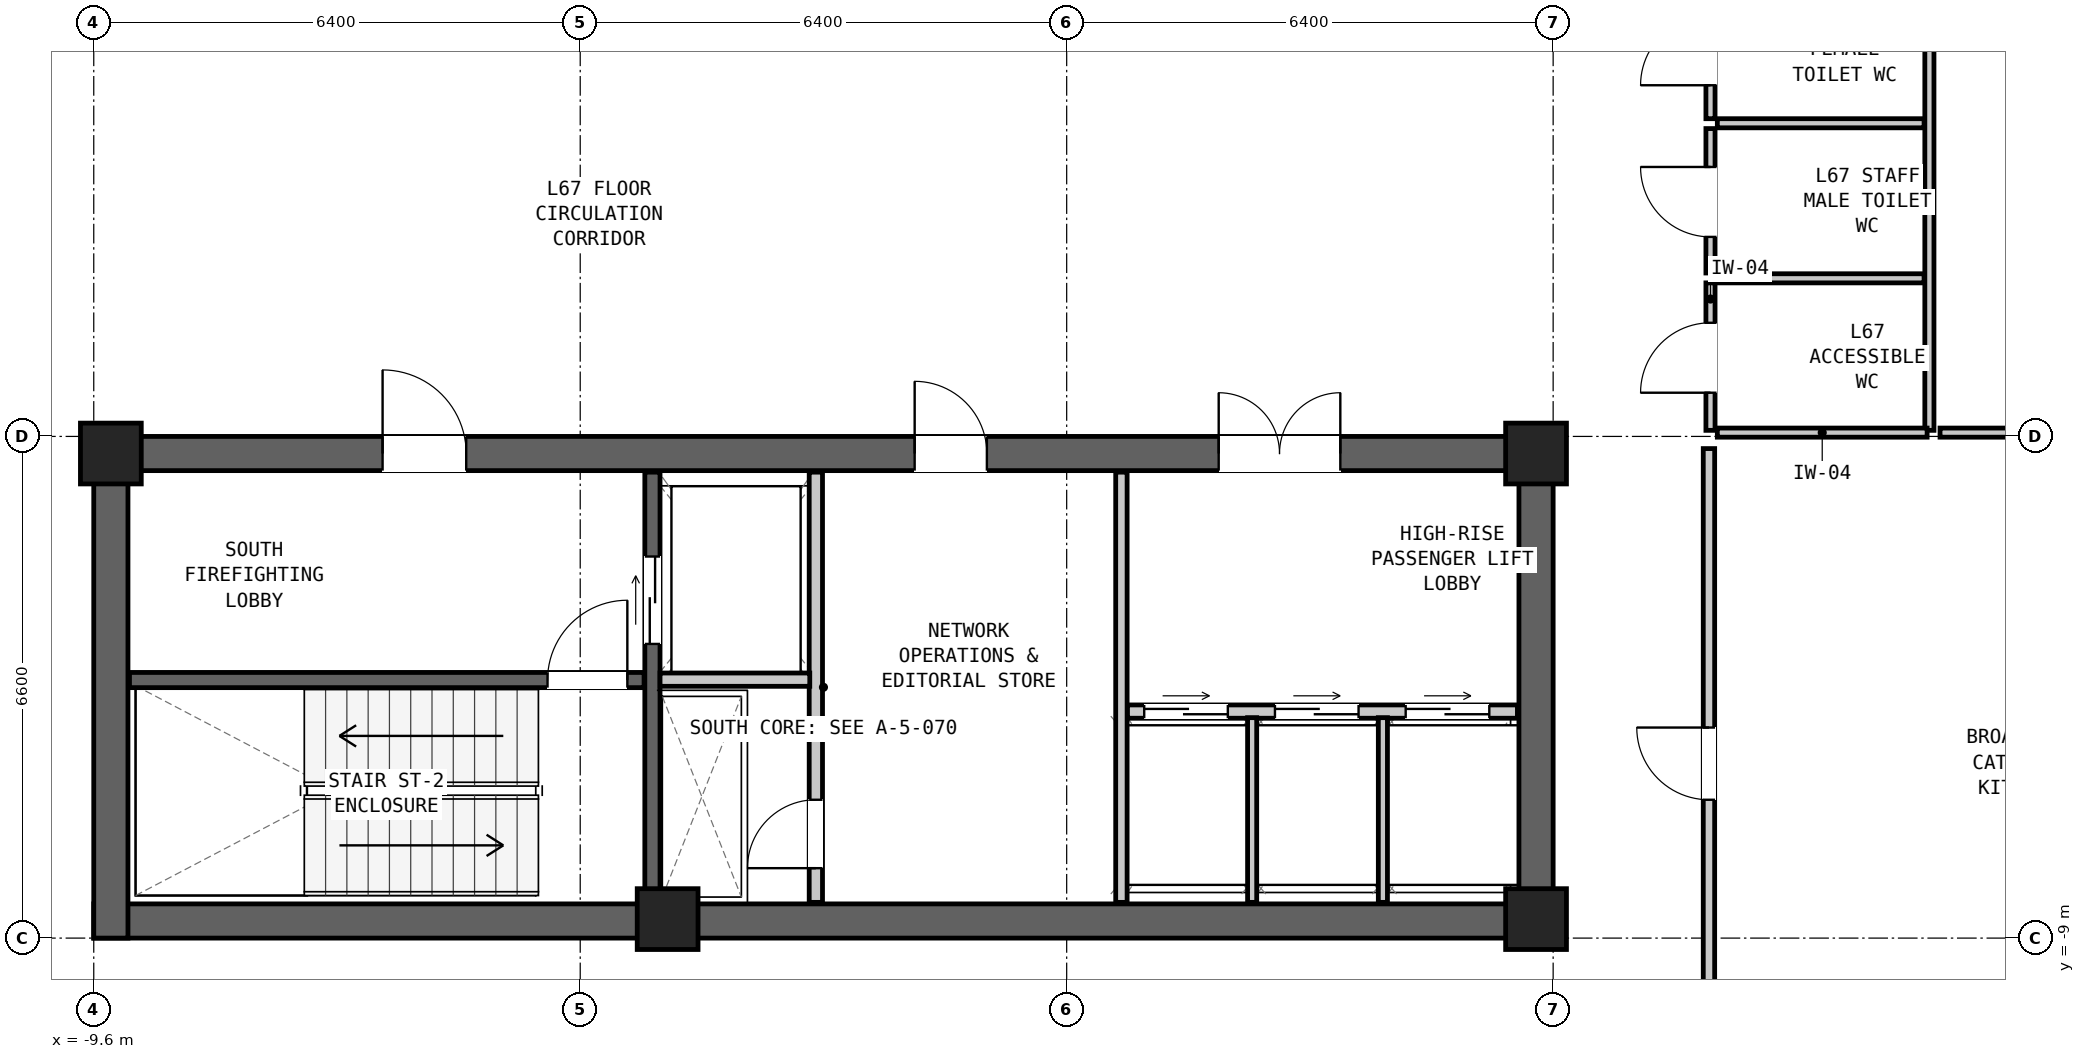
"""IFC4 building model, lengths in metres.
Left out: names, types, materials, properties, quantities, classifications, styles, units other than length and angle.
Written with IfcOpenShell. Run it as: python <this file> out.ifc"""

import sys

from ifc_helpers import new_model, si_unit, direction, frame, frame_2d, origin, origin_2d, place, context, subcontext, project, spatial, rectangle, extrude, element, fill, save


model = new_model("IFC4")
c1 = context("Model", 3, precision=1e-05, world=origin(), true_north=direction((0.0, 1.0)))
c2 = subcontext(c1, "Body", "Model", "MODEL_VIEW")
j1 = project(units=[si_unit("LENGTHUNIT", "METRE"), si_unit("PLANEANGLEUNIT", "RADIAN")], contexts=[c1])
p1 = place(None, origin())
s1 = spatial("IfcSite", under=j1, at=p1, CompositionType="ELEMENT")
p2 = place(p1, origin())
s2 = spatial("IfcBuilding", under=s1, at=p2, CompositionType="ELEMENT")
p3 = place(p2, frame((0.0, 0.0, 226.95)))
s3 = spatial("IfcBuildingStorey", under=s2, at=p3, CompositionType="ELEMENT", Elevation=226.95)
p4 = place(p3, frame((-9.6, -8.775, 0.0), z_axis=(0.0, 0.0, 1.0), x_axis=(1.0, 0.0, 0.0)))
e1 = element("IfcWall", 1, at=p4, inside=s3, PredefinedType="SHEAR", context=c2, shape_type="SweptSolid", body=[
    extrude(rectangle(XDim=19.2, YDim=0.45, at=frame_2d((9.6, 0.0))), origin(), (0.0, 0.0, 1.0), 4.35),
])
p5 = place(p3, frame((-9.6, -2.625, 0.0), z_axis=(0.0, 0.0, 1.0), x_axis=(1.0, 0.0, 0.0)))
e2 = element("IfcWall", 2, at=p5, inside=s3, PredefinedType="SHEAR", context=c2, shape_type="SweptSolid", body=[
    extrude(rectangle(XDim=19.2, YDim=0.45, at=frame_2d((9.6, 0.0))), origin(), (0.0, 0.0, 1.0), 4.35),
])
p6 = place(p5, frame((3.8, 0.0, 0.0)))
e3 = element("IfcOpeningElement", 3, at=p6, cuts=e2, PredefinedType="OPENING", context=c2, shape_type="SweptSolid", body=[
    extrude(rectangle(XDim=1.1, YDim=2.08, at=frame_2d((0.55, 1.04))), frame((0.0, 0.237, 0.0), z_axis=(0.0, -1.0, 0.0), x_axis=(1.0, 0.0, 0.0)), (0.0, 0.0, 1.0), 0.474),
])
p7 = place(p5, frame((10.8, 0.0, 0.0)))
e4 = element("IfcOpeningElement", 4, at=p7, cuts=e2, PredefinedType="OPENING", context=c2, shape_type="SweptSolid", body=[
    extrude(rectangle(XDim=0.95, YDim=2.1, at=frame_2d((0.475, 1.05))), frame((0.0, 0.237, 0.0), z_axis=(0.0, -1.0, 0.0), x_axis=(1.0, 0.0, 0.0)), (0.0, 0.0, 1.0), 0.474),
])
p8 = place(p5, frame((14.8, 0.0, 0.0)))
e5 = element("IfcOpeningElement", 5, at=p8, cuts=e2, PredefinedType="OPENING", context=c2, shape_type="SweptSolid", body=[
    extrude(rectangle(XDim=1.6, YDim=2.12, at=frame_2d((0.8, 1.06))), frame((0.0, 0.237, 0.0), z_axis=(0.0, -1.0, 0.0), x_axis=(1.0, 0.0, 0.0)), (0.0, 0.0, 1.0), 0.474),
])
for number, where, z_axis, x_axis in (
    (6, (-9.375, -9.0, 0.0), (0.0, 0.0, 1.0), (0.0, 1.0, 0.0)),
    (7, (9.375, -9.0, 0.0), (0.0, 0.0, 1.0), (0.0, 1.0, 0.0)),
):
    element("IfcWall", number, at=place(p3, frame(where, z_axis=z_axis, x_axis=x_axis)), inside=s3, PredefinedType="SHEAR", context=c2, shape_type="SweptSolid", body=[
        extrude(rectangle(XDim=6.6, YDim=0.45, at=frame_2d((3.3, 0.0))), origin(), (0.0, 0.0, 1.0), 4.35),
    ])
for number, where, z_axis, x_axis in (
    (8, (-9.375, -2.625, 0.0), (0.0, 0.0, 1.0), (1.0, 0.0, 0.0)),
    (9, (9.375, -2.625, 0.0), (0.0, 0.0, 1.0), (1.0, 0.0, 0.0)),
    (10, (-2.05, -8.75, 0.0), (0.0, 0.0, 1.0), (1.0, 0.0, 0.0)),
    (11, (9.375, -8.75, 0.0), (0.0, 0.0, 1.0), (1.0, 0.0, 0.0)),
):
    element("IfcColumn", number, at=place(p3, frame(where, z_axis=z_axis, x_axis=x_axis)), inside=s3, PredefinedType="COLUMN", context=c2, shape_type="SweptSolid", body=[
        extrude(rectangle(XDim=0.8, YDim=0.8, at=origin_2d()), origin(), (0.0, 0.0, 1.0), 4.35),
    ])
p9 = place(p3, frame((-9.13, -5.605, 0.0), z_axis=(0.0, 0.0, 1.0), x_axis=(1.0, 0.0, 0.0)))
e12 = element("IfcWall", 12, at=p9, inside=s3, PredefinedType="SHEAR", context=c2, shape_type="SweptSolid", body=[
    extrude(rectangle(XDim=6.77, YDim=0.2, at=frame_2d((3.385, 0.0))), origin(), (0.0, 0.0, 1.0), 4.07),
])
p10 = place(p9, frame((5.5, 0.0, 0.0)))
e13 = element("IfcOpeningElement", 13, at=p10, cuts=e12, PredefinedType="OPENING", context=c2, shape_type="SweptSolid", body=[
    extrude(rectangle(XDim=1.05, YDim=2.08, at=frame_2d((0.525, 1.04))), frame((0.0, 0.112, 0.0), z_axis=(0.0, -1.0, 0.0), x_axis=(1.0, 0.0, 0.0)), (0.0, 0.0, 1.0), 0.224),
])
p11 = place(p3, frame((-2.25, -8.53, 0.0), z_axis=(0.0, 0.0, 1.0), x_axis=(0.0, 1.0, 0.0)))
e14 = element("IfcWall", 14, at=p11, inside=s3, PredefinedType="SHEAR", context=c2, shape_type="SweptSolid", body=[
    extrude(rectangle(XDim=5.66, YDim=0.2, at=frame_2d((2.83, 0.0))), origin(), (0.0, 0.0, 1.0), 4.07),
])
p12 = place(p11, frame((3.4, 0.0, 0.0)))
e15 = element("IfcOpeningElement", 15, at=p12, cuts=e14, PredefinedType="OPENING", context=c2, shape_type="SweptSolid", body=[
    extrude(rectangle(XDim=1.15, YDim=2.08, at=frame_2d((0.575, 1.04))), frame((0.0, 0.112, 0.0), z_axis=(0.0, -1.0, 0.0), x_axis=(1.0, 0.0, 0.0)), (0.0, 0.0, 1.0), 0.224),
])
p13 = place(p3, frame((-0.1, -8.53, 0.0), z_axis=(0.0, 0.0, 1.0), x_axis=(0.0, 1.0, 0.0)))
e16 = element("IfcWall", 16, at=p13, inside=s3, PredefinedType="PARTITIONING", context=c2, shape_type="SweptSolid", body=[
    extrude(rectangle(XDim=5.66, YDim=0.175, at=frame_2d((2.83, 0.0))), origin(), (0.0, 0.0, 1.0), 4.07),
])
p14 = place(p13, frame((0.45, 0.0, 0.0)))
e17 = element("IfcOpeningElement", 17, at=p14, cuts=e16, PredefinedType="OPENING", context=c2, shape_type="SweptSolid", body=[
    extrude(rectangle(XDim=0.9, YDim=2.05, at=frame_2d((0.45, 1.025))), frame((0.0, 0.1, 0.0), z_axis=(0.0, -1.0, 0.0), x_axis=(1.0, 0.0, 0.0)), (0.0, 0.0, 1.0), 0.199),
])
p15 = place(p3, frame((-2.15, -5.6, 0.0), z_axis=(0.0, 0.0, 1.0), x_axis=(1.0, 0.0, 0.0)))
e18 = element("IfcWall", 18, at=p15, inside=s3, PredefinedType="PARTITIONING", context=c2, shape_type="SweptSolid", body=[
    extrude(rectangle(XDim=1.97, YDim=0.175, at=frame_2d((0.985, 0.0))), origin(), (0.0, 0.0, 1.0), 4.07),
])
p16 = place(p3, frame((3.92, -8.53, 0.0), z_axis=(0.0, 0.0, 1.0), x_axis=(0.0, 1.0, 0.0)))
e19 = element("IfcWall", 19, at=p16, inside=s3, PredefinedType="PARTITIONING", context=c2, shape_type="SweptSolid", body=[
    extrude(rectangle(XDim=5.66, YDim=0.15, at=frame_2d((2.83, 0.0))), origin(), (0.0, 0.0, 1.0), 4.07),
])
p17 = place(p3, frame((4.0, -6.02, 0.0), z_axis=(0.0, 0.0, 1.0), x_axis=(1.0, 0.0, 0.0)))
e20 = element("IfcWall", 20, at=p17, inside=s3, PredefinedType="PARTITIONING", context=c2, shape_type="SweptSolid", body=[
    extrude(rectangle(XDim=5.13, YDim=0.175, at=frame_2d((2.565, 0.0))), origin(), (0.0, 0.0, 1.0), 4.07),
])
p18 = place(p17, frame((0.22, 0.0, 0.0)))
e21 = element("IfcOpeningElement", 21, at=p18, cuts=e20, PredefinedType="OPENING", context=c2, shape_type="SweptSolid", body=[
    extrude(rectangle(XDim=1.1, YDim=2.06, at=frame_2d((0.55, 1.03))), frame((0.0, 0.1, 0.0), z_axis=(0.0, -1.0, 0.0), x_axis=(1.0, 0.0, 0.0)), (0.0, 0.0, 1.0), 0.199),
])
p19 = place(p17, frame((1.94, 0.0, 0.0)))
e22 = element("IfcOpeningElement", 22, at=p19, cuts=e20, PredefinedType="OPENING", context=c2, shape_type="SweptSolid", body=[
    extrude(rectangle(XDim=1.1, YDim=2.06, at=frame_2d((0.55, 1.03))), frame((0.0, 0.1, 0.0), z_axis=(0.0, -1.0, 0.0), x_axis=(1.0, 0.0, 0.0)), (0.0, 0.0, 1.0), 0.199),
])
p20 = place(p17, frame((3.66, 0.0, 0.0)))
e23 = element("IfcOpeningElement", 23, at=p20, cuts=e20, PredefinedType="OPENING", context=c2, shape_type="SweptSolid", body=[
    extrude(rectangle(XDim=1.1, YDim=2.06, at=frame_2d((0.55, 1.03))), frame((0.0, 0.1, 0.0), z_axis=(0.0, -1.0, 0.0), x_axis=(1.0, 0.0, 0.0)), (0.0, 0.0, 1.0), 0.199),
])
for number, where, z_axis, x_axis in (
    (24, (5.64, -8.53, 0.0), (0.0, 0.0, 1.0), (0.0, 1.0, 0.0)),
    (25, (7.36, -8.53, 0.0), (0.0, 0.0, 1.0), (0.0, 1.0, 0.0)),
):
    element("IfcWall", number, at=place(p3, frame(where, z_axis=z_axis, x_axis=x_axis)), inside=s3, PredefinedType="PARTITIONING", context=c2, shape_type="SweptSolid", body=[
        extrude(rectangle(XDim=2.43, YDim=0.12, at=frame_2d((1.215, 0.0))), origin(), (0.0, 0.0, 1.0), 4.07),
    ])
p21 = place(p3, frame((11.67, -2.32, 0.0), z_axis=(0.0, 0.0, 1.0), x_axis=(0.0, 1.0, 0.0)))
e26 = element("IfcWall", 26, at=p21, inside=s3, PredefinedType="PARTITIONING", context=c2, shape_type="SweptSolid", body=[
    extrude(rectangle(XDim=1.94, YDim=0.12, at=frame_2d((0.97, 0.0))), origin(), (0.0, 0.0, 1.0), 4.07),
])
p22 = place(p21, frame((0.495, 0.0, 0.0)))
e27 = element("IfcOpeningElement", 27, at=p22, cuts=e26, PredefinedType="OPENING", context=c2, shape_type="SweptSolid", body=[
    extrude(rectangle(XDim=0.92, YDim=2.1, at=frame_2d((0.46, 1.05))), frame((0.0, 0.072, 0.0), z_axis=(0.0, -1.0, 0.0), x_axis=(1.0, 0.0, 0.0)), (0.0, 0.0, 1.0), 0.144),
])
p23 = place(p3, frame((11.67, -0.25, 0.0), z_axis=(0.0, 0.0, 1.0), x_axis=(0.0, 1.0, 0.0)))
e28 = element("IfcWall", 28, at=p23, inside=s3, PredefinedType="PARTITIONING", context=c2, shape_type="SweptSolid", body=[
    extrude(rectangle(XDim=1.9, YDim=0.12, at=frame_2d((0.95, 0.0))), origin(), (0.0, 0.0, 1.0), 4.07),
])
p24 = place(p23, frame((0.475, 0.0, 0.0)))
e29 = element("IfcOpeningElement", 29, at=p24, cuts=e28, PredefinedType="OPENING", context=c2, shape_type="SweptSolid", body=[
    extrude(rectangle(XDim=0.92, YDim=2.1, at=frame_2d((0.46, 1.05))), frame((0.0, 0.072, 0.0), z_axis=(0.0, -1.0, 0.0), x_axis=(1.0, 0.0, 0.0)), (0.0, 0.0, 1.0), 0.144),
])
p25 = place(p3, frame((11.67, 1.78, 0.0), z_axis=(0.0, 0.0, 1.0), x_axis=(0.0, 1.0, 0.0)))
e30 = element("IfcWall", 30, at=p25, inside=s3, PredefinedType="PARTITIONING", context=c2, shape_type="SweptSolid", body=[
    extrude(rectangle(XDim=1.83, YDim=0.12, at=frame_2d((0.915, 0.0))), origin(), (0.0, 0.0, 1.0), 4.07),
])
p26 = place(p25, frame((0.44, 0.0, 0.0)))
e31 = element("IfcOpeningElement", 31, at=p26, cuts=e30, PredefinedType="OPENING", context=c2, shape_type="SweptSolid", body=[
    extrude(rectangle(XDim=0.92, YDim=2.1, at=frame_2d((0.46, 1.05))), frame((0.0, 0.072, 0.0), z_axis=(0.0, -1.0, 0.0), x_axis=(1.0, 0.0, 0.0)), (0.0, 0.0, 1.0), 0.144),
])
p27 = place(p3, frame((14.55, -2.32, 0.0), z_axis=(0.0, 0.0, 1.0), x_axis=(0.0, 1.0, 0.0)))
e32 = element("IfcWall", 32, at=p27, inside=s3, PredefinedType="PARTITIONING", context=c2, shape_type="SweptSolid", body=[
    extrude(rectangle(XDim=5.93, YDim=0.12, at=frame_2d((2.965, 0.0))), origin(), (0.0, 0.0, 1.0), 4.07),
])
p28 = place(p3, frame((11.76, -2.35, 0.0), z_axis=(0.0, 0.0, 1.0), x_axis=(1.0, 0.0, 0.0)))
e33 = element("IfcWall", 33, at=p28, inside=s3, PredefinedType="PARTITIONING", context=c2, shape_type="SweptSolid", body=[
    extrude(rectangle(XDim=2.76, YDim=0.12, at=frame_2d((1.38, 0.0))), origin(), (0.0, 0.0, 1.0), 2.25),
])
p29 = place(p3, frame((11.76, -0.32, 0.0), z_axis=(0.0, 0.0, 1.0), x_axis=(1.0, 0.0, 0.0)))
e34 = element("IfcWall", 34, at=p29, inside=s3, PredefinedType="PARTITIONING", context=c2, shape_type="SweptSolid", body=[
    extrude(rectangle(XDim=2.72, YDim=0.12, at=frame_2d((1.36, 0.0))), origin(), (0.0, 0.0, 1.0), 4.07),
])
p30 = place(p3, frame((11.76, 1.72, 0.0), z_axis=(0.0, 0.0, 1.0), x_axis=(1.0, 0.0, 0.0)))
e35 = element("IfcWall", 35, at=p30, inside=s3, PredefinedType="PARTITIONING", context=c2, shape_type="SweptSolid", body=[
    extrude(rectangle(XDim=2.72, YDim=0.12, at=frame_2d((1.36, 0.0))), origin(), (0.0, 0.0, 1.0), 2.25),
])
p31 = place(p3, frame((14.69, -2.35, 0.0), z_axis=(0.0, 0.0, 1.0), x_axis=(1.0, 0.0, 0.0)))
e36 = element("IfcWall", 36, at=p31, inside=s3, PredefinedType="PARTITIONING", context=c2, shape_type="SweptSolid", body=[
    extrude(rectangle(XDim=4.69, YDim=0.12, at=frame_2d((2.345, 0.0))), origin(), (0.0, 0.0, 1.0), 2.25),
])
p32 = place(p3, frame((11.65, -10.85, 0.0), z_axis=(0.0, 0.0, 1.0), x_axis=(0.0, 1.0, 0.0)))
e37 = element("IfcWall", 37, at=p32, inside=s3, PredefinedType="PARTITIONING", context=c2, shape_type="SweptSolid", body=[
    extrude(rectangle(XDim=8.29, YDim=0.15, at=frame_2d((4.145, 0.0))), origin(), (0.0, 0.0, 1.0), 4.07),
])
p33 = place(p32, frame((3.67, 0.0, 0.0)))
e38 = element("IfcOpeningElement", 38, at=p33, cuts=e37, PredefinedType="OPENING", context=c2, shape_type="SweptSolid", body=[
    extrude(rectangle(XDim=0.95, YDim=2.1, at=frame_2d((0.475, 1.05))), frame((0.0, 0.087, 0.0), z_axis=(0.0, -1.0, 0.0), x_axis=(1.0, 0.0, 0.0)), (0.0, 0.0, 1.0), 0.174),
])
p34 = place(p10, origin())
e39 = element("IfcDoor", 39, at=p34, inside=s3, OperationType="SINGLE_SWING_RIGHT", PredefinedType="DOOR", context=c2, shape_type="SweptSolid", body=[
    extrude(rectangle(XDim=1.05, YDim=2.08, at=frame_2d((0.525, 1.04))), frame((0.0, 0.025, 0.0), z_axis=(0.0, -1.0, 0.0), x_axis=(1.0, 0.0, 0.0)), (0.0, 0.0, 1.0), 0.05),
])
fill(e13, e39)
p35 = place(p6, origin())
e40 = element("IfcDoor", 40, at=p35, inside=s3, OperationType="SINGLE_SWING_LEFT", PredefinedType="DOOR", context=c2, shape_type="SweptSolid", body=[
    extrude(rectangle(XDim=1.1, YDim=2.08, at=frame_2d((0.55, 1.04))), frame((0.0, 0.025, 0.0), z_axis=(0.0, -1.0, 0.0), x_axis=(1.0, 0.0, 0.0)), (0.0, 0.0, 1.0), 0.05),
])
fill(e3, e40)
p36 = place(p12, origin())
e41 = element("IfcDoor", 41, at=p36, inside=s3, OperationType="DOUBLE_DOOR_SLIDING", PredefinedType="DOOR", context=c2, shape_type="SweptSolid", body=[
    extrude(rectangle(XDim=1.15, YDim=2.08, at=frame_2d((0.575, 1.04))), frame((0.0, 0.025, 0.0), z_axis=(0.0, -1.0, 0.0), x_axis=(1.0, 0.0, 0.0)), (0.0, 0.0, 1.0), 0.05),
])
fill(e15, e41)
p37 = place(p14, origin())
e42 = element("IfcDoor", 42, at=p37, inside=s3, OperationType="SINGLE_SWING_LEFT", PredefinedType="DOOR", context=c2, shape_type="SweptSolid", body=[
    extrude(rectangle(XDim=0.9, YDim=2.05, at=frame_2d((0.45, 1.025))), frame((0.0, 0.025, 0.0), z_axis=(0.0, -1.0, 0.0), x_axis=(1.0, 0.0, 0.0)), (0.0, 0.0, 1.0), 0.05),
])
fill(e17, e42)
p38 = place(p7, origin())
e43 = element("IfcDoor", 43, at=p38, inside=s3, OperationType="SINGLE_SWING_LEFT", PredefinedType="DOOR", context=c2, shape_type="SweptSolid", body=[
    extrude(rectangle(XDim=0.95, YDim=2.1, at=frame_2d((0.475, 1.05))), frame((0.0, 0.025, 0.0), z_axis=(0.0, -1.0, 0.0), x_axis=(1.0, 0.0, 0.0)), (0.0, 0.0, 1.0), 0.05),
])
fill(e4, e43)
p39 = place(p18, origin())
e44 = element("IfcDoor", 44, at=p39, inside=s3, OperationType="DOUBLE_DOOR_SLIDING", PredefinedType="DOOR", context=c2, shape_type="SweptSolid", body=[
    extrude(rectangle(XDim=1.1, YDim=2.06, at=frame_2d((0.55, 1.03))), frame((0.0, 0.025, 0.0), z_axis=(0.0, -1.0, 0.0), x_axis=(1.0, 0.0, 0.0)), (0.0, 0.0, 1.0), 0.05),
])
fill(e21, e44)
p40 = place(p19, origin())
e45 = element("IfcDoor", 45, at=p40, inside=s3, OperationType="DOUBLE_DOOR_SLIDING", PredefinedType="DOOR", context=c2, shape_type="SweptSolid", body=[
    extrude(rectangle(XDim=1.1, YDim=2.06, at=frame_2d((0.55, 1.03))), frame((0.0, 0.025, 0.0), z_axis=(0.0, -1.0, 0.0), x_axis=(1.0, 0.0, 0.0)), (0.0, 0.0, 1.0), 0.05),
])
fill(e22, e45)
p41 = place(p20, origin())
e46 = element("IfcDoor", 46, at=p41, inside=s3, OperationType="DOUBLE_DOOR_SLIDING", PredefinedType="DOOR", context=c2, shape_type="SweptSolid", body=[
    extrude(rectangle(XDim=1.1, YDim=2.06, at=frame_2d((0.55, 1.03))), frame((0.0, 0.025, 0.0), z_axis=(0.0, -1.0, 0.0), x_axis=(1.0, 0.0, 0.0)), (0.0, 0.0, 1.0), 0.05),
])
fill(e23, e46)
p42 = place(p8, origin())
e47 = element("IfcDoor", 47, at=p42, inside=s3, OperationType="DOUBLE_DOOR_SINGLE_SWING", PredefinedType="DOOR", context=c2, shape_type="SweptSolid", body=[
    extrude(rectangle(XDim=1.6, YDim=2.12, at=frame_2d((0.8, 1.06))), frame((0.0, 0.025, 0.0), z_axis=(0.0, -1.0, 0.0), x_axis=(1.0, 0.0, 0.0)), (0.0, 0.0, 1.0), 0.05),
])
fill(e5, e47)
p43 = place(p22, origin())
e48 = element("IfcDoor", 48, at=p43, inside=s3, OperationType="SINGLE_SWING_LEFT", PredefinedType="DOOR", context=c2, shape_type="SweptSolid", body=[
    extrude(rectangle(XDim=0.92, YDim=2.1, at=frame_2d((0.46, 1.05))), frame((0.0, 0.025, 0.0), z_axis=(0.0, -1.0, 0.0), x_axis=(1.0, 0.0, 0.0)), (0.0, 0.0, 1.0), 0.05),
])
fill(e27, e48)
p44 = place(p24, origin())
e49 = element("IfcDoor", 49, at=p44, inside=s3, OperationType="SINGLE_SWING_RIGHT", PredefinedType="DOOR", context=c2, shape_type="SweptSolid", body=[
    extrude(rectangle(XDim=0.92, YDim=2.1, at=frame_2d((0.46, 1.05))), frame((0.0, 0.025, 0.0), z_axis=(0.0, -1.0, 0.0), x_axis=(1.0, 0.0, 0.0)), (0.0, 0.0, 1.0), 0.05),
])
fill(e29, e49)
p45 = place(p26, origin())
e50 = element("IfcDoor", 50, at=p45, inside=s3, OperationType="SINGLE_SWING_LEFT", PredefinedType="DOOR", context=c2, shape_type="SweptSolid", body=[
    extrude(rectangle(XDim=0.92, YDim=2.1, at=frame_2d((0.46, 1.05))), frame((0.0, 0.025, 0.0), z_axis=(0.0, -1.0, 0.0), x_axis=(1.0, 0.0, 0.0)), (0.0, 0.0, 1.0), 0.05),
])
fill(e31, e50)
p46 = place(p33, origin())
e51 = element("IfcDoor", 51, at=p46, inside=s3, OperationType="SINGLE_SWING_RIGHT", PredefinedType="DOOR", context=c2, shape_type="SweptSolid", body=[
    extrude(rectangle(XDim=0.95, YDim=2.1, at=frame_2d((0.475, 1.05))), frame((0.0, 0.025, 0.0), z_axis=(0.0, -1.0, 0.0), x_axis=(1.0, 0.0, 0.0)), (0.0, 0.0, 1.0), 0.05),
])
fill(e38, e51)
save(model, sys.argv[1])
